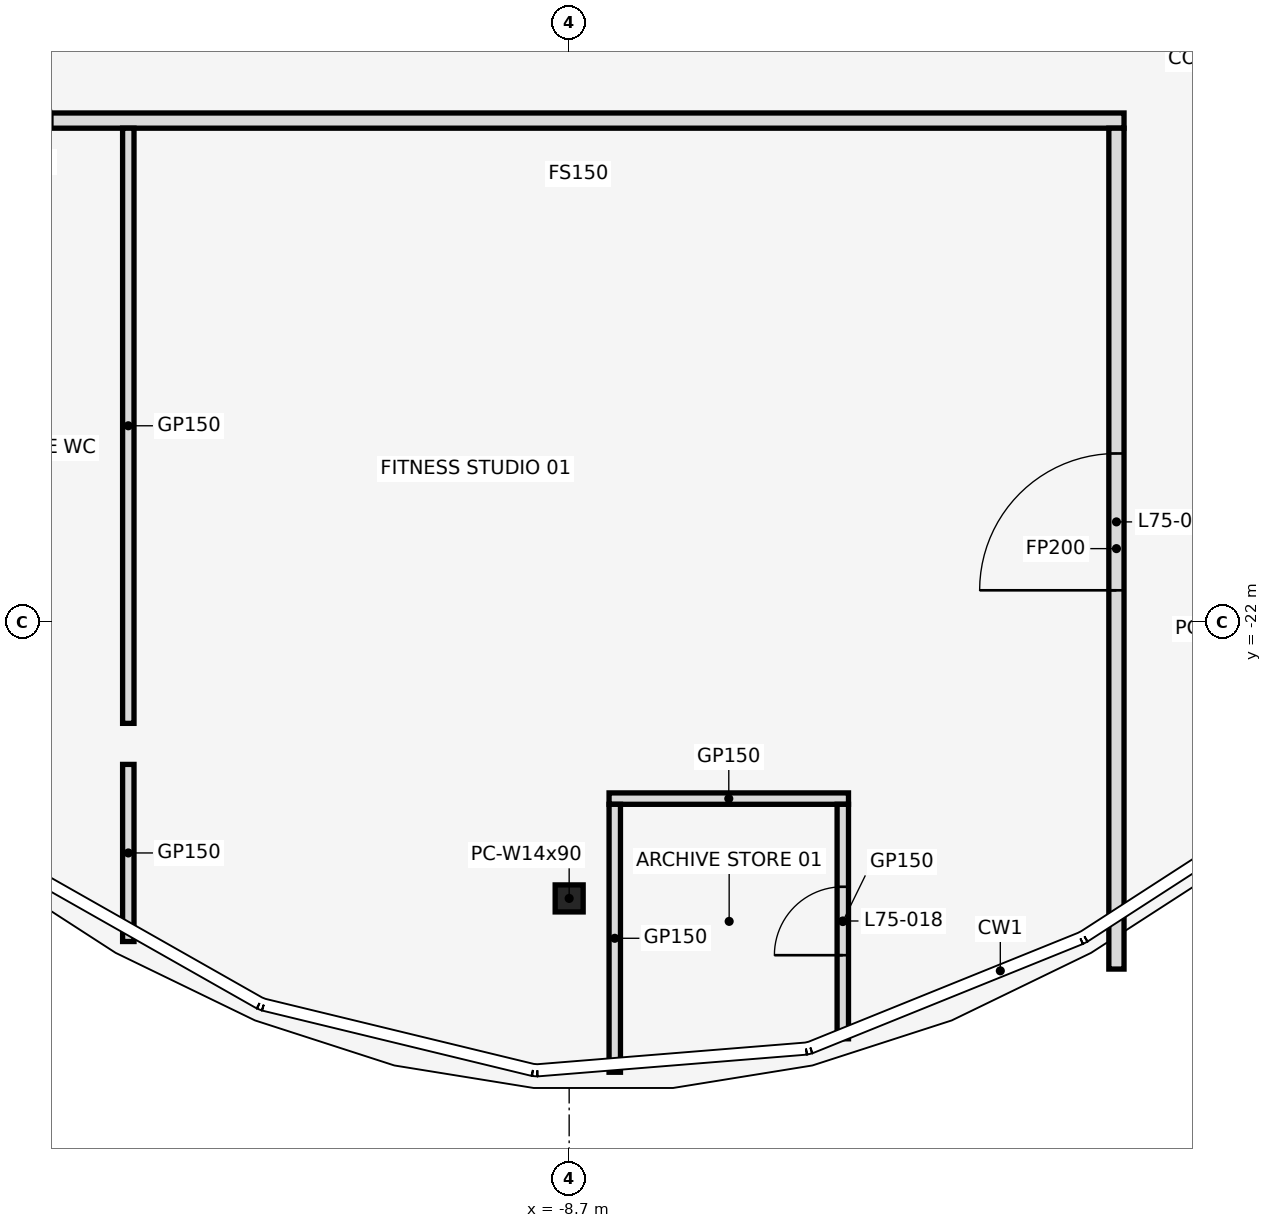
"""IFC4 building model, lengths in metres.
Left out: names, types, materials, properties, quantities, classifications, styles, units other than length and angle.
Written with IfcOpenShell. Run it as: python <this file> out.ifc"""

import sys

from ifc_helpers import new_model, si_unit, direction, frame, frame_2d, origin, origin_2d, place, context, subcontext, project, spatial, rectangle, i_section, extrude, element, fill, save


model = new_model("IFC4")
c1 = context("Model", 3, precision=1e-05, world=origin(), true_north=direction((0.0, 1.0)))
c2 = subcontext(c1, "Body", "Model", "MODEL_VIEW")
j1 = project(units=[si_unit("LENGTHUNIT", "METRE"), si_unit("PLANEANGLEUNIT", "RADIAN")], contexts=[c1])
p1 = place(None, origin())
s1 = spatial("IfcSite", under=j1, at=p1, CompositionType="ELEMENT")
p2 = place(p1, origin())
s2 = spatial("IfcBuilding", under=s1, at=p2, CompositionType="ELEMENT")
p3 = place(p2, frame((0.0, 0.0, 333.5)))
s3 = spatial("IfcBuildingStorey", under=s2, at=p3, CompositionType="ELEMENT", Elevation=333.5)
p4 = place(p3, frame((-8.7, -25.633, 0.0), z_axis=(0.0, 0.0, 1.0), x_axis=(1.0, 0.0, 0.0)))
e1 = element("IfcColumn", 1, at=p4, inside=s3, PredefinedType="COLUMN", context=c2, shape_type="SweptSolid", body=[
    extrude(i_section(OverallWidth=0.368, OverallDepth=0.356, WebThickness=0.011, FlangeThickness=0.018, at=origin_2d()), origin(), (0.0, 0.0, 1.0), 4.5),
])
p5 = place(p3, frame((-8.175, -24.32, 0.0), z_axis=(0.0, 0.0, 1.0), x_axis=(1.0, 0.0, 0.0)))
e2 = element("IfcWall", 2, at=p5, inside=s3, PredefinedType="PARTITIONING", context=c2, shape_type="SweptSolid", body=[
    extrude(rectangle(XDim=3.15, YDim=0.15, at=frame_2d((1.575, 0.0))), origin(), (0.0, 0.0, 1.0), 3.339),
])
p6 = place(p3, frame((-33.34, -15.4, 0.0), z_axis=(0.0, 0.0, 1.0), x_axis=(1.0, 0.0, 0.0)))
e3 = element("IfcWall", 3, at=p6, inside=s3, PredefinedType="PARTITIONING", context=c2, shape_type="SweptSolid", body=[
    extrude(rectangle(XDim=31.94, YDim=0.2, at=frame_2d((15.97, 0.0))), origin(), (0.0, 0.0, 1.0), 3.339),
])
p7 = place(p6, frame((3.1, 0.0, 0.0)))
e4 = element("IfcOpeningElement", 4, at=p7, cuts=e3, PredefinedType="OPENING", context=c2, shape_type="SweptSolid", body=[
    extrude(rectangle(XDim=1.0, YDim=2.1, at=frame_2d((0.5, 1.05))), frame((0.0, 0.112, 0.0), z_axis=(0.0, -1.0, 0.0), x_axis=(1.0, 0.0, 0.0)), (0.0, 0.0, 1.0), 0.224),
])
p8 = place(p6, frame((11.14, 0.0, 0.0)))
e5 = element("IfcOpeningElement", 5, at=p8, cuts=e3, PredefinedType="OPENING", context=c2, shape_type="SweptSolid", body=[
    extrude(rectangle(XDim=0.9, YDim=2.1, at=frame_2d((0.45, 1.05))), frame((0.0, 0.112, 0.0), z_axis=(0.0, -1.0, 0.0), x_axis=(1.0, 0.0, 0.0)), (0.0, 0.0, 1.0), 0.224),
])
p9 = place(p6, frame((16.84, 0.0, 0.0)))
e6 = element("IfcOpeningElement", 6, at=p9, cuts=e3, PredefinedType="OPENING", context=c2, shape_type="SweptSolid", body=[
    extrude(rectangle(XDim=1.0, YDim=2.1, at=frame_2d((0.5, 1.05))), frame((0.0, 0.112, 0.0), z_axis=(0.0, -1.0, 0.0), x_axis=(1.0, 0.0, 0.0)), (0.0, 0.0, 1.0), 0.224),
])
p10 = place(p3, frame((-14.5, -26.2, 0.0), z_axis=(0.0, 0.0, 1.0), x_axis=(0.0, 1.0, 0.0)))
e7 = element("IfcWall", 7, at=p10, inside=s3, PredefinedType="PARTITIONING", context=c2, shape_type="SweptSolid", body=[
    extrude(rectangle(XDim=2.33, YDim=0.15, at=frame_2d((1.165, 0.0))), origin(), (0.0, 0.0, 1.0), 3.339),
])
p11 = place(p3, frame((-14.5, -23.33, 0.0), z_axis=(0.0, 0.0, 1.0), x_axis=(0.0, 1.0, 0.0)))
e8 = element("IfcWall", 8, at=p11, inside=s3, PredefinedType="PARTITIONING", context=c2, shape_type="SweptSolid", body=[
    extrude(rectangle(XDim=7.83, YDim=0.15, at=frame_2d((3.915, 0.0))), origin(), (0.0, 0.0, 1.0), 3.339),
])
p12 = place(p3, frame((-8.1, -27.92, 0.0), z_axis=(0.0, 0.0, 1.0), x_axis=(0.0, 1.0, 0.0)))
e9 = element("IfcWall", 9, at=p12, inside=s3, PredefinedType="PARTITIONING", context=c2, shape_type="SweptSolid", body=[
    extrude(rectangle(XDim=3.525, YDim=0.15, at=frame_2d((1.762, 0.0))), origin(), (0.0, 0.0, 1.0), 3.339),
])
p13 = place(p3, frame((-5.1, -27.48, 0.0), z_axis=(0.0, 0.0, 1.0), x_axis=(0.0, 1.0, 0.0)))
e10 = element("IfcWall", 10, at=p13, inside=s3, PredefinedType="PARTITIONING", context=c2, shape_type="SweptSolid", body=[
    extrude(rectangle(XDim=3.085, YDim=0.15, at=frame_2d((1.542, 0.0))), origin(), (0.0, 0.0, 1.0), 3.339),
])
p14 = place(p13, frame((1.1, 0.0, 0.0)))
e11 = element("IfcOpeningElement", 11, at=p14, cuts=e10, PredefinedType="OPENING", context=c2, shape_type="SweptSolid", body=[
    extrude(rectangle(XDim=0.9, YDim=2.1, at=frame_2d((0.45, 1.05))), frame((0.0, 0.087, 0.0), z_axis=(0.0, -1.0, 0.0), x_axis=(1.0, 0.0, 0.0)), (0.0, 0.0, 1.0), 0.174),
])
p15 = place(p3, frame((-1.5, -26.562, 0.0), z_axis=(0.0, 0.0, 1.0), x_axis=(0.0, 1.0, 0.0)))
e12 = element("IfcWall", 12, at=p15, inside=s3, PredefinedType="PARTITIONING", context=c2, shape_type="SweptSolid", body=[
    extrude(rectangle(XDim=11.062, YDim=0.2, at=frame_2d((5.531, 0.0))), origin(), (0.0, 0.0, 1.0), 3.339),
])
p16 = place(p15, frame((4.983, 0.0, 0.0)))
e13 = element("IfcOpeningElement", 13, at=p16, cuts=e12, PredefinedType="OPENING", context=c2, shape_type="SweptSolid", body=[
    extrude(rectangle(XDim=1.8, YDim=2.1, at=frame_2d((0.9, 1.05))), frame((0.0, 0.112, 0.0), z_axis=(0.0, -1.0, 0.0), x_axis=(1.0, 0.0, 0.0)), (0.0, 0.0, 1.0), 0.224),
])
p17 = place(p16, origin())
e14 = element("IfcDoor", 14, at=p17, inside=s3, OperationType="SINGLE_SWING_LEFT", PredefinedType="DOOR", context=c2, shape_type="SweptSolid", body=[
    extrude(rectangle(XDim=1.8, YDim=2.1, at=frame_2d((0.9, 1.05))), frame((0.0, 0.025, 0.0), z_axis=(0.0, -1.0, 0.0), x_axis=(1.0, 0.0, 0.0)), (0.0, 0.0, 1.0), 0.05),
])
fill(e13, e14)
p18 = place(p14, origin())
e15 = element("IfcDoor", 15, at=p18, inside=s3, OperationType="SINGLE_SWING_RIGHT", PredefinedType="DOOR", context=c2, shape_type="SweptSolid", body=[
    extrude(rectangle(XDim=0.9, YDim=2.1, at=frame_2d((0.45, 1.05))), frame((0.0, 0.025, 0.0), z_axis=(0.0, -1.0, 0.0), x_axis=(1.0, 0.0, 0.0)), (0.0, 0.0, 1.0), 0.05),
])
fill(e11, e15)
save(model, sys.argv[1])
